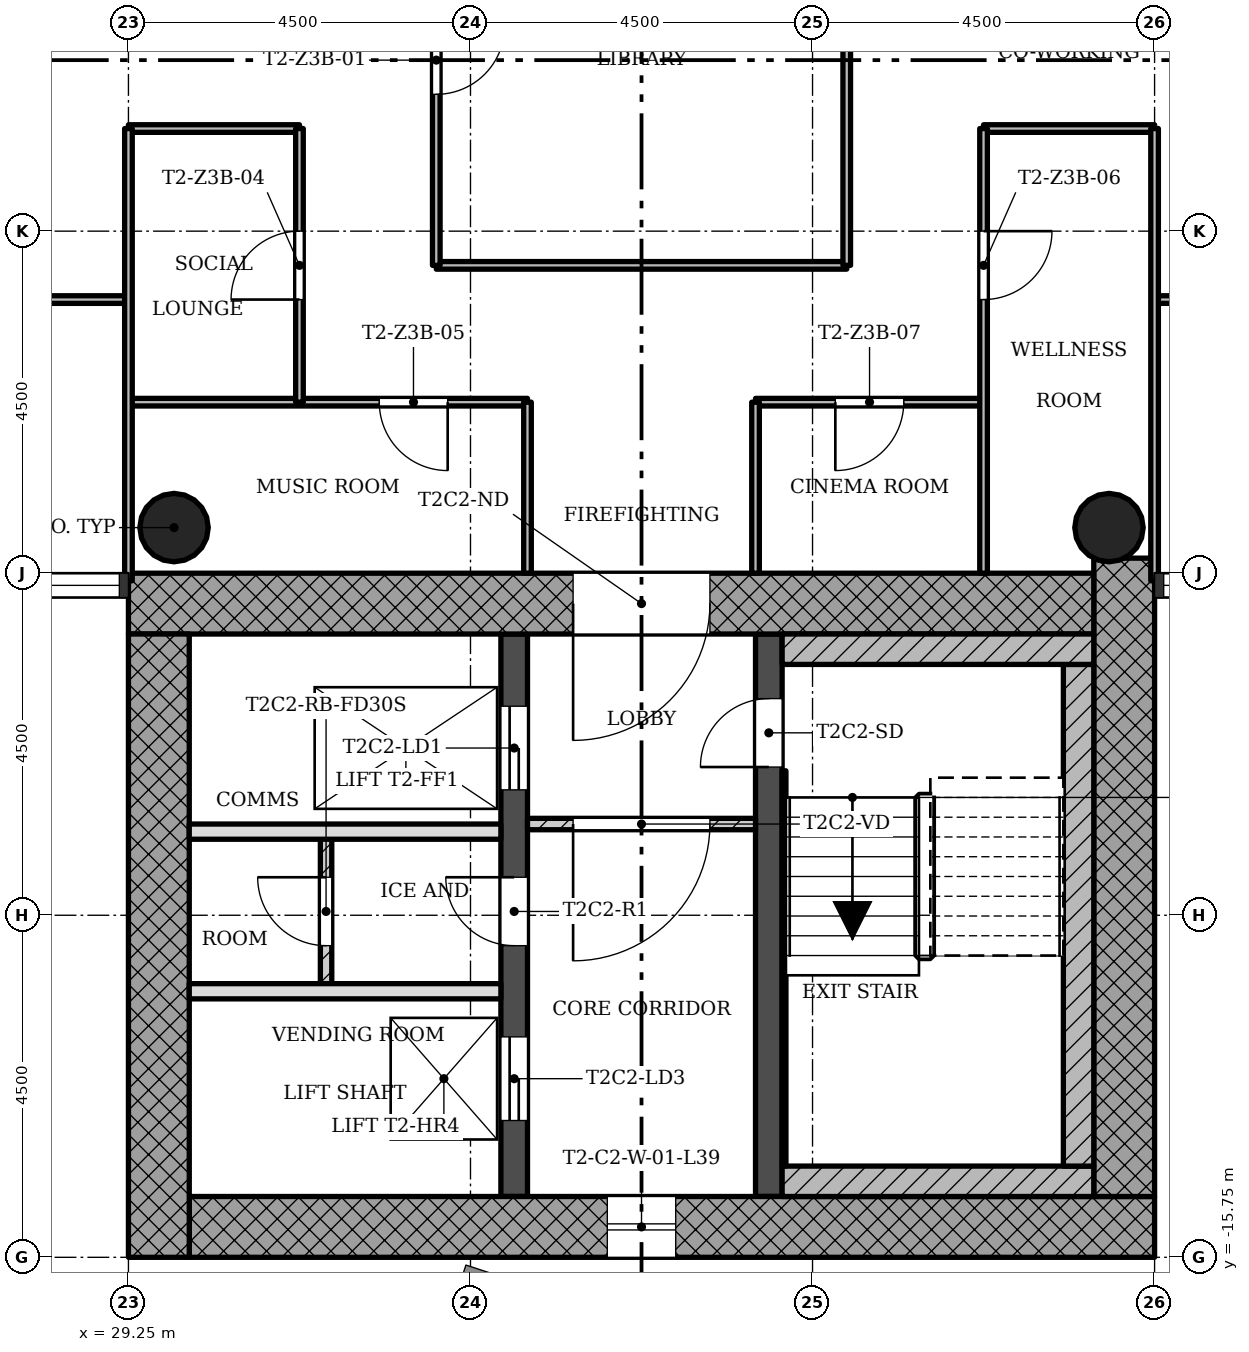
"""IFC4 building model, lengths in metres.
Left out: names, types, materials, properties, quantities, classifications, styles, units other than length and angle.
Written with IfcOpenShell. Run it as: python <this file> out.ifc"""

import sys

from ifc_helpers import new_model, si_unit, direction, frame, frame_2d, origin, origin_2d, place, context, subcontext, project, spatial, rectangle, hollow_circle, extrude, element, fill, save


model = new_model("IFC4")
c1 = context("Model", 3, precision=1e-05, world=origin(), true_north=direction((0.0, 1.0)))
c2 = subcontext(c1, "Body", "Model", "MODEL_VIEW")
j1 = project(units=[si_unit("LENGTHUNIT", "METRE"), si_unit("PLANEANGLEUNIT", "RADIAN")], contexts=[c1])
p1 = place(None, origin())
s1 = spatial("IfcSite", under=j1, at=p1, CompositionType="ELEMENT")
p2 = place(p1, origin())
s2 = spatial("IfcBuilding", under=s1, at=p2, CompositionType="ELEMENT")
p3 = place(p2, frame((0.0, 0.0, 143.9)))
s3 = spatial("IfcBuildingStorey", under=s2, at=p3, CompositionType="ELEMENT", Elevation=143.9)
p4 = place(p3, frame((30.05, -15.35, 0.0), z_axis=(0.0, 0.0, 1.0), x_axis=(1.0, 0.0, 0.0)))
e1 = element("IfcWall", 1, at=p4, inside=s3, PredefinedType="SHEAR", context=c2, shape_type="SweptSolid", body=[
    extrude(rectangle(XDim=12.7, YDim=0.8, at=frame_2d((6.35, 0.0))), origin(), (0.0, 0.0, 1.0), 3.4),
])
p5 = place(p4, frame((5.5, 0.0, 0.45)))
e2 = element("IfcOpeningElement", 2, at=p5, cuts=e1, PredefinedType="OPENING", context=c2, shape_type="SweptSolid", body=[
    extrude(rectangle(XDim=0.9, YDim=2.4, at=frame_2d((0.45, 1.2))), frame((0.0, 0.41, 0.0), z_axis=(0.0, -1.0, 0.0), x_axis=(1.0, 0.0, 0.0)), (0.0, 0.0, 1.0), 0.82),
])
p6 = place(p3, frame((42.35, -14.95, 0.0), z_axis=(0.0, 0.0, 1.0), x_axis=(0.0, 1.0, 0.0)))
e3 = element("IfcWall", 3, at=p6, inside=s3, PredefinedType="SHEAR", context=c2, shape_type="SweptSolid", body=[
    extrude(rectangle(XDim=8.398, YDim=0.8, at=frame_2d((4.199, 0.0))), origin(), (0.0, 0.0, 1.0), 3.4),
])
p7 = place(p3, frame((41.95, -7.15, 0.0), z_axis=(0.0, 0.0, 1.0), x_axis=(-1.0, 0.0, 0.0)))
e4 = element("IfcWall", 4, at=p7, inside=s3, PredefinedType="SHEAR", context=c2, shape_type="SweptSolid", body=[
    extrude(rectangle(XDim=12.7, YDim=0.8, at=frame_2d((6.35, 0.0))), origin(), (0.0, 0.0, 1.0), 3.4),
])
p8 = place(p7, frame((5.05, 0.0, 0.0)))
e5 = element("IfcOpeningElement", 5, at=p8, cuts=e4, PredefinedType="OPENING", context=c2, shape_type="SweptSolid", body=[
    extrude(rectangle(XDim=1.8, YDim=2.1, at=frame_2d((0.9, 1.05))), frame((0.0, 0.41, 0.0), z_axis=(0.0, -1.0, 0.0), x_axis=(1.0, 0.0, 0.0)), (0.0, 0.0, 1.0), 0.82),
])
p9 = place(p3, frame((29.65, -7.55, 0.0), z_axis=(0.0, 0.0, 1.0), x_axis=(0.0, -1.0, 0.0)))
e6 = element("IfcWall", 6, at=p9, inside=s3, PredefinedType="SHEAR", context=c2, shape_type="SweptSolid", body=[
    extrude(rectangle(XDim=8.2, YDim=0.8, at=frame_2d((4.1, 0.0))), origin(), (0.0, 0.0, 1.0), 3.4),
])
p10 = place(p3, frame((34.325, -14.95, 0.0), z_axis=(0.0, 0.0, 1.0), x_axis=(0.0, 1.0, 0.0)))
e7 = element("IfcWall", 7, at=p10, inside=s3, PredefinedType="SHEAR", context=c2, shape_type="SweptSolid", body=[
    extrude(rectangle(XDim=7.4, YDim=0.35, at=frame_2d((3.7, 0.0))), origin(), (0.0, 0.0, 1.0), 3.4),
])
p11 = place(p10, frame((5.35, 0.0, 0.0)))
e8 = element("IfcOpeningElement", 8, at=p11, cuts=e7, PredefinedType="OPENING", context=c2, shape_type="SweptSolid", body=[
    extrude(rectangle(XDim=1.1, YDim=2.1, at=frame_2d((0.55, 1.05))), frame((0.0, 0.185, 0.0), z_axis=(0.0, -1.0, 0.0), x_axis=(1.0, 0.0, 0.0)), (0.0, 0.0, 1.0), 0.37),
])
p12 = place(p10, frame((1.0, 0.0, 0.0)))
e9 = element("IfcOpeningElement", 9, at=p12, cuts=e7, PredefinedType="OPENING", context=c2, shape_type="SweptSolid", body=[
    extrude(rectangle(XDim=1.1, YDim=2.1, at=frame_2d((0.55, 1.05))), frame((0.0, 0.185, 0.0), z_axis=(0.0, -1.0, 0.0), x_axis=(1.0, 0.0, 0.0)), (0.0, 0.0, 1.0), 0.37),
])
p13 = place(p10, frame((3.3, 0.0, 0.0)))
e10 = element("IfcOpeningElement", 10, at=p13, cuts=e7, PredefinedType="OPENING", context=c2, shape_type="SweptSolid", body=[
    extrude(rectangle(XDim=0.9, YDim=2.1, at=frame_2d((0.45, 1.05))), frame((0.0, 0.185, 0.0), z_axis=(0.0, -1.0, 0.0), x_axis=(1.0, 0.0, 0.0)), (0.0, 0.0, 1.0), 0.37),
])
p14 = place(p3, frame((37.675, -14.95, 0.0), z_axis=(0.0, 0.0, 1.0), x_axis=(0.0, 1.0, 0.0)))
e11 = element("IfcWall", 11, at=p14, inside=s3, PredefinedType="SHEAR", context=c2, shape_type="SweptSolid", body=[
    extrude(rectangle(XDim=7.4, YDim=0.35, at=frame_2d((3.7, 0.0))), origin(), (0.0, 0.0, 1.0), 3.4),
])
p15 = place(p14, frame((5.65, 0.0, 0.0)))
e12 = element("IfcOpeningElement", 12, at=p15, cuts=e11, PredefinedType="OPENING", context=c2, shape_type="SweptSolid", body=[
    extrude(rectangle(XDim=0.9, YDim=2.1, at=frame_2d((0.45, 1.05))), frame((0.0, 0.185, 0.0), z_axis=(0.0, -1.0, 0.0), x_axis=(1.0, 0.0, 0.0)), (0.0, 0.0, 1.0), 0.37),
])
for number, where, z_axis, x_axis in (
    (13, (42.15, -6.15, 0.0), (0.0, 0.0, 1.0), (1.0, 0.0, 0.0)),
    (14, (29.85, -6.15, 0.0), (0.0, 0.0, 1.0), (1.0, 0.0, 0.0)),
):
    element("IfcColumn", number, at=place(p3, frame(where, z_axis=z_axis, x_axis=x_axis)), inside=s3, PredefinedType="COLUMN", context=c2, shape_type="SweptSolid", body=[
        extrude(hollow_circle(Radius=0.45, WallThickness=0.032, at=origin_2d()), origin(), (0.0, 0.0, 1.0), 3.4),
    ])
p16 = place(p3, frame((34.5, -10.05, 0.0), z_axis=(0.0, 0.0, 1.0), x_axis=(1.0, 0.0, 0.0)))
e15 = element("IfcWall", 15, at=p16, inside=s3, PredefinedType="PARTITIONING", context=c2, shape_type="SweptSolid", body=[
    extrude(rectangle(XDim=3.0, YDim=0.15, at=frame_2d((1.5, 0.0))), origin(), (0.0, 0.0, 1.0), 3.0),
])
p17 = place(p16, frame((0.6, 0.0, 0.0)))
e16 = element("IfcOpeningElement", 16, at=p17, cuts=e15, PredefinedType="OPENING", context=c2, shape_type="SweptSolid", body=[
    extrude(rectangle(XDim=1.8, YDim=2.1, at=frame_2d((0.9, 1.05))), frame((0.0, 0.085, 0.0), z_axis=(0.0, -1.0, 0.0), x_axis=(1.0, 0.0, 0.0)), (0.0, 0.0, 1.0), 0.17),
])
for number, where, z_axis, x_axis in (
    (17, (30.05, -12.25, 0.0), (0.0, 0.0, 1.0), (1.0, 0.0, 0.0)),
    (18, (30.05, -10.15, 0.0), (0.0, 0.0, 1.0), (1.0, 0.0, 0.0)),
):
    element("IfcWall", number, at=place(p3, frame(where, z_axis=z_axis, x_axis=x_axis)), inside=s3, PredefinedType="SOLIDWALL", context=c2, shape_type="SweptSolid", body=[
        extrude(rectangle(XDim=4.1, YDim=0.2, at=frame_2d((2.05, 0.0))), origin(), (0.0, 0.0, 1.0), 3.0),
    ])
p18 = place(p3, frame((31.85, -10.15, 0.0), z_axis=(0.0, 0.0, 1.0), x_axis=(0.0, -1.0, 0.0)))
e19 = element("IfcWall", 19, at=p18, inside=s3, PredefinedType="PARTITIONING", context=c2, shape_type="SweptSolid", body=[
    extrude(rectangle(XDim=2.1, YDim=0.15, at=frame_2d((1.05, 0.0))), origin(), (0.0, 0.0, 1.0), 3.0),
])
p19 = place(p18, frame((0.6, 0.0, 0.0)))
e20 = element("IfcOpeningElement", 20, at=p19, cuts=e19, PredefinedType="OPENING", context=c2, shape_type="SweptSolid", body=[
    extrude(rectangle(XDim=0.9, YDim=2.1, at=frame_2d((0.45, 1.05))), frame((0.0, 0.085, 0.0), z_axis=(0.0, -1.0, 0.0), x_axis=(1.0, 0.0, 0.0)), (0.0, 0.0, 1.0), 0.17),
])
p20 = place(p3, frame((40.5, -4.5, 0.0), z_axis=(0.0, 0.0, 1.0), x_axis=(-1.0, 0.0, 0.0)))
e21 = element("IfcWall", 21, at=p20, inside=s3, PredefinedType="PARTITIONING", context=c2, shape_type="SweptSolid", body=[
    extrude(rectangle(XDim=3.0, YDim=0.1, at=frame_2d((1.5, 0.0))), origin(), (0.0, 0.0, 1.0), 3.0),
])
p21 = place(p20, frame((1.05, 0.0, 0.0)))
e22 = element("IfcOpeningElement", 22, at=p21, cuts=e21, PredefinedType="OPENING", context=c2, shape_type="SweptSolid", body=[
    extrude(rectangle(XDim=0.9, YDim=2.1, at=frame_2d((0.45, 1.05))), frame((0.0, 0.06, 0.0), z_axis=(0.0, -1.0, 0.0), x_axis=(1.0, 0.0, 0.0)), (0.0, 0.0, 1.0), 0.12),
])
p22 = place(p3, frame((34.5, -4.5, 0.0), z_axis=(0.0, 0.0, 1.0), x_axis=(-1.0, 0.0, 0.0)))
e23 = element("IfcWall", 23, at=p22, inside=s3, PredefinedType="PARTITIONING", context=c2, shape_type="SweptSolid", body=[
    extrude(rectangle(XDim=5.25, YDim=0.1, at=frame_2d((2.625, 0.0))), origin(), (0.0, 0.0, 1.0), 3.0),
])
p23 = place(p22, frame((1.05, 0.0, 0.0)))
e24 = element("IfcOpeningElement", 24, at=p23, cuts=e23, PredefinedType="OPENING", context=c2, shape_type="SweptSolid", body=[
    extrude(rectangle(XDim=0.9, YDim=2.1, at=frame_2d((0.45, 1.05))), frame((0.0, 0.06, 0.0), z_axis=(0.0, -1.0, 0.0), x_axis=(1.0, 0.0, 0.0)), (0.0, 0.0, 1.0), 0.12),
])
p24 = place(p3, frame((47.25, -3.15, 0.0), z_axis=(0.0, 0.0, 1.0), x_axis=(-1.0, 0.0, 0.0)))
e25 = element("IfcWall", 25, at=p24, inside=s3, PredefinedType="PARTITIONING", context=c2, shape_type="SweptSolid", body=[
    extrude(rectangle(XDim=4.5, YDim=0.1, at=frame_2d((2.25, 0.0))), origin(), (0.0, 0.0, 1.0), 3.0),
])
p25 = place(p24, frame((1.8, 0.0, 0.0)))
e26 = element("IfcOpeningElement", 26, at=p25, cuts=e25, PredefinedType="OPENING", context=c2, shape_type="SweptSolid", body=[
    extrude(rectangle(XDim=0.9, YDim=2.1, at=frame_2d((0.45, 1.05))), frame((0.0, 0.06, 0.0), z_axis=(0.0, -1.0, 0.0), x_axis=(1.0, 0.0, 0.0)), (0.0, 0.0, 1.0), 0.12),
])
p26 = place(p3, frame((29.25, -3.15, 0.0), z_axis=(0.0, 0.0, 1.0), x_axis=(-1.0, 0.0, 0.0)))
e27 = element("IfcWall", 27, at=p26, inside=s3, PredefinedType="PARTITIONING", context=c2, shape_type="SweptSolid", body=[
    extrude(rectangle(XDim=9.0, YDim=0.1, at=frame_2d((4.5, 0.0))), origin(), (0.0, 0.0, 1.0), 3.0),
])
p27 = place(p26, frame((1.8, 0.0, 0.0)))
e28 = element("IfcOpeningElement", 28, at=p27, cuts=e27, PredefinedType="OPENING", context=c2, shape_type="SweptSolid", body=[
    extrude(rectangle(XDim=0.9, YDim=2.1, at=frame_2d((0.45, 1.05))), frame((0.0, 0.06, 0.0), z_axis=(0.0, -1.0, 0.0), x_axis=(1.0, 0.0, 0.0)), (0.0, 0.0, 1.0), 0.12),
])
p28 = place(p26, frame((6.3, 0.0, 0.0)))
e29 = element("IfcOpeningElement", 29, at=p28, cuts=e27, PredefinedType="OPENING", context=c2, shape_type="SweptSolid", body=[
    extrude(rectangle(XDim=0.9, YDim=2.1, at=frame_2d((0.45, 1.05))), frame((0.0, 0.06, 0.0), z_axis=(0.0, -1.0, 0.0), x_axis=(1.0, 0.0, 0.0)), (0.0, 0.0, 1.0), 0.12),
])
p29 = place(p3, frame((38.7, -2.7, 0.0), z_axis=(0.0, 0.0, 1.0), x_axis=(-1.0, 0.0, 0.0)))
e30 = element("IfcWall", 30, at=p29, inside=s3, PredefinedType="PARTITIONING", context=c2, shape_type="SweptSolid", body=[
    extrude(rectangle(XDim=5.4, YDim=0.1, at=frame_2d((2.7, 0.0))), origin(), (0.0, 0.0, 1.0), 3.0),
])
for number, where, z_axis, x_axis in (
    (31, (42.75, -0.9, 0.0), (0.0, 0.0, 1.0), (-1.0, 0.0, 0.0)),
    (32, (31.5, -0.9, 0.0), (0.0, 0.0, 1.0), (-1.0, 0.0, 0.0)),
):
    element("IfcWall", number, at=place(p3, frame(where, z_axis=z_axis, x_axis=x_axis)), inside=s3, PredefinedType="PARTITIONING", context=c2, shape_type="SweptSolid", body=[
        extrude(rectangle(XDim=2.25, YDim=0.1, at=frame_2d((1.125, 0.0))), origin(), (0.0, 0.0, 1.0), 3.0),
    ])
p30 = place(p3, frame((42.75, -6.85, 0.0), z_axis=(0.0, 0.0, 1.0), x_axis=(0.0, 1.0, 0.0)))
e33 = element("IfcWall", 33, at=p30, inside=s3, PredefinedType="PARTITIONING", context=c2, shape_type="SweptSolid", body=[
    extrude(rectangle(XDim=5.95, YDim=0.1, at=frame_2d((2.975, 0.0))), origin(), (0.0, 0.0, 1.0), 3.0),
])
p31 = place(p3, frame((40.5, -6.75, 0.0), z_axis=(0.0, 0.0, 1.0), x_axis=(0.0, 1.0, 0.0)))
e34 = element("IfcWall", 34, at=p31, inside=s3, PredefinedType="PARTITIONING", context=c2, shape_type="SweptSolid", body=[
    extrude(rectangle(XDim=5.85, YDim=0.1, at=frame_2d((2.925, 0.0))), origin(), (0.0, 0.0, 1.0), 3.0),
])
p32 = place(p31, frame((3.6, 0.0, 0.0)))
e35 = element("IfcOpeningElement", 35, at=p32, cuts=e34, PredefinedType="OPENING", context=c2, shape_type="SweptSolid", body=[
    extrude(rectangle(XDim=0.9, YDim=2.1, at=frame_2d((0.45, 1.05))), frame((0.0, 0.06, 0.0), z_axis=(0.0, -1.0, 0.0), x_axis=(1.0, 0.0, 0.0)), (0.0, 0.0, 1.0), 0.12),
])
p33 = place(p3, frame((38.7, -2.7, 0.0), z_axis=(0.0, 0.0, 1.0), x_axis=(0.0, 1.0, 0.0)))
e36 = element("IfcWall", 36, at=p33, inside=s3, PredefinedType="PARTITIONING", context=c2, shape_type="SweptSolid", body=[
    extrude(rectangle(XDim=5.4, YDim=0.1, at=frame_2d((2.7, 0.0))), origin(), (0.0, 0.0, 1.0), 3.0),
])
for number, where, z_axis, x_axis in (
    (37, (37.5, -6.75, 0.0), (0.0, 0.0, 1.0), (0.0, 1.0, 0.0)),
    (38, (34.5, -6.75, 0.0), (0.0, 0.0, 1.0), (0.0, 1.0, 0.0)),
):
    element("IfcWall", number, at=place(p3, frame(where, z_axis=z_axis, x_axis=x_axis)), inside=s3, PredefinedType="PARTITIONING", context=c2, shape_type="SweptSolid", body=[
        extrude(rectangle(XDim=2.25, YDim=0.1, at=frame_2d((1.125, 0.0))), origin(), (0.0, 0.0, 1.0), 3.0),
    ])
p34 = place(p3, frame((33.3, -2.7, 0.0), z_axis=(0.0, 0.0, 1.0), x_axis=(0.0, 1.0, 0.0)))
e39 = element("IfcWall", 39, at=p34, inside=s3, PredefinedType="PARTITIONING", context=c2, shape_type="SweptSolid", body=[
    extrude(rectangle(XDim=5.4, YDim=0.1, at=frame_2d((2.7, 0.0))), origin(), (0.0, 0.0, 1.0), 3.0),
])
p35 = place(p34, frame((2.25, 0.0, 0.0)))
e40 = element("IfcOpeningElement", 40, at=p35, cuts=e39, PredefinedType="OPENING", context=c2, shape_type="SweptSolid", body=[
    extrude(rectangle(XDim=0.9, YDim=2.1, at=frame_2d((0.45, 1.05))), frame((0.0, 0.06, 0.0), z_axis=(0.0, -1.0, 0.0), x_axis=(1.0, 0.0, 0.0)), (0.0, 0.0, 1.0), 0.12),
])
p36 = place(p3, frame((31.5, -4.5, 0.0), z_axis=(0.0, 0.0, 1.0), x_axis=(0.0, 1.0, 0.0)))
e41 = element("IfcWall", 41, at=p36, inside=s3, PredefinedType="PARTITIONING", context=c2, shape_type="SweptSolid", body=[
    extrude(rectangle(XDim=3.6, YDim=0.1, at=frame_2d((1.8, 0.0))), origin(), (0.0, 0.0, 1.0), 3.0),
])
p37 = place(p36, frame((1.35, 0.0, 0.0)))
e42 = element("IfcOpeningElement", 42, at=p37, cuts=e41, PredefinedType="OPENING", context=c2, shape_type="SweptSolid", body=[
    extrude(rectangle(XDim=0.9, YDim=2.1, at=frame_2d((0.45, 1.05))), frame((0.0, 0.06, 0.0), z_axis=(0.0, -1.0, 0.0), x_axis=(1.0, 0.0, 0.0)), (0.0, 0.0, 1.0), 0.12),
])
p38 = place(p3, frame((29.25, -6.85, 0.0), z_axis=(0.0, 0.0, 1.0), x_axis=(0.0, 1.0, 0.0)))
e43 = element("IfcWall", 43, at=p38, inside=s3, PredefinedType="PARTITIONING", context=c2, shape_type="SweptSolid", body=[
    extrude(rectangle(XDim=5.95, YDim=0.1, at=frame_2d((2.975, 0.0))), origin(), (0.0, 0.0, 1.0), 3.0),
])
p39 = place(p3, frame((37.85, -14.75, 0.0), z_axis=(0.0, 0.0, 1.0), x_axis=(1.0, 0.0, 0.0)))
e44 = element("IfcWall", 44, at=p39, inside=s3, PredefinedType="SHEAR", context=c2, shape_type="SweptSolid", body=[
    extrude(rectangle(XDim=4.1, YDim=0.4, at=frame_2d((2.05, 0.0))), origin(), (0.0, 0.0, 1.0), 3.4),
])
p40 = place(p3, frame((41.75, -7.95, 0.0), z_axis=(0.0, 0.0, 1.0), x_axis=(0.0, -1.0, 0.0)))
e45 = element("IfcWall", 45, at=p40, inside=s3, PredefinedType="SHEAR", context=c2, shape_type="SweptSolid", body=[
    extrude(rectangle(XDim=6.6, YDim=0.4, at=frame_2d((3.3, 0.0))), origin(), (0.0, 0.0, 1.0), 3.4),
])
p41 = place(p3, frame((37.85, -7.75, 0.0), z_axis=(0.0, 0.0, 1.0), x_axis=(1.0, 0.0, 0.0)))
e46 = element("IfcWall", 46, at=p41, inside=s3, PredefinedType="SHEAR", context=c2, shape_type="SweptSolid", body=[
    extrude(rectangle(XDim=4.1, YDim=0.4, at=frame_2d((2.05, 0.0))), origin(), (0.0, 0.0, 1.0), 3.4),
])
p42 = place(p3, frame((37.875, -9.35, 0.0), z_axis=(0.0, 0.0, 1.0), x_axis=(0.0, -1.0, 0.0)))
e47 = element("IfcWall", 47, at=p42, inside=s3, PredefinedType="SHEAR", context=c2, shape_type="SweptSolid", body=[
    extrude(rectangle(XDim=5.2, YDim=0.05, at=frame_2d((2.6, 0.0))), origin(), (0.0, 0.0, 1.0), 3.4),
])
p43 = place(p5, origin())
e48 = element("IfcWindow", 48, at=p43, inside=s3, PartitioningType="SINGLE_PANEL", PredefinedType="WINDOW", context=c2, shape_type="SweptSolid", body=[
    extrude(rectangle(XDim=0.9, YDim=2.4, at=frame_2d((0.45, 1.2))), frame((0.0, 0.03, 0.0), z_axis=(0.0, -1.0, 0.0), x_axis=(1.0, 0.0, 0.0)), (0.0, 0.0, 1.0), 0.06),
])
fill(e2, e48)
p44 = place(p17, origin())
e49 = element("IfcDoor", 49, at=p44, inside=s3, OperationType="SINGLE_SWING_LEFT", PredefinedType="DOOR", context=c2, shape_type="SweptSolid", body=[
    extrude(rectangle(XDim=1.8, YDim=2.1, at=frame_2d((0.9, 1.05))), frame((0.0, 0.025, 0.0), z_axis=(0.0, -1.0, 0.0), x_axis=(1.0, 0.0, 0.0)), (0.0, 0.0, 1.0), 0.05),
])
fill(e16, e49)
p45 = place(p19, origin())
e50 = element("IfcDoor", 50, at=p45, inside=s3, OperationType="SINGLE_SWING_LEFT", PredefinedType="DOOR", context=c2, shape_type="SweptSolid", body=[
    extrude(rectangle(XDim=0.9, YDim=2.1, at=frame_2d((0.45, 1.05))), frame((0.0, 0.025, 0.0), z_axis=(0.0, -1.0, 0.0), x_axis=(1.0, 0.0, 0.0)), (0.0, 0.0, 1.0), 0.05),
])
fill(e20, e50)
p46 = place(p35, origin())
e51 = element("IfcDoor", 51, at=p46, inside=s3, OperationType="SINGLE_SWING_RIGHT", PredefinedType="DOOR", context=c2, shape_type="SweptSolid", body=[
    extrude(rectangle(XDim=0.9, YDim=2.1, at=frame_2d((0.45, 1.05))), frame((0.0, 0.025, 0.0), z_axis=(0.0, -1.0, 0.0), x_axis=(1.0, 0.0, 0.0)), (0.0, 0.0, 1.0), 0.05),
])
fill(e40, e51)
p47 = place(p37, origin())
e52 = element("IfcDoor", 52, at=p47, inside=s3, OperationType="SINGLE_SWING_RIGHT", PredefinedType="DOOR", context=c2, shape_type="SweptSolid", body=[
    extrude(rectangle(XDim=0.9, YDim=2.1, at=frame_2d((0.45, 1.05))), frame((0.0, 0.025, 0.0), z_axis=(0.0, -1.0, 0.0), x_axis=(1.0, 0.0, 0.0)), (0.0, 0.0, 1.0), 0.05),
])
fill(e42, e52)
p48 = place(p23, origin())
e53 = element("IfcDoor", 53, at=p48, inside=s3, OperationType="SINGLE_SWING_RIGHT", PredefinedType="DOOR", context=c2, shape_type="SweptSolid", body=[
    extrude(rectangle(XDim=0.9, YDim=2.1, at=frame_2d((0.45, 1.05))), frame((0.0, 0.025, 0.0), z_axis=(0.0, -1.0, 0.0), x_axis=(1.0, 0.0, 0.0)), (0.0, 0.0, 1.0), 0.05),
])
fill(e24, e53)
p49 = place(p32, origin())
e54 = element("IfcDoor", 54, at=p49, inside=s3, OperationType="SINGLE_SWING_RIGHT", PredefinedType="DOOR", context=c2, shape_type="SweptSolid", body=[
    extrude(rectangle(XDim=0.9, YDim=2.1, at=frame_2d((0.45, 1.05))), frame((0.0, 0.025, 0.0), z_axis=(0.0, -1.0, 0.0), x_axis=(1.0, 0.0, 0.0)), (0.0, 0.0, 1.0), 0.05),
])
fill(e35, e54)
p50 = place(p21, origin())
e55 = element("IfcDoor", 55, at=p50, inside=s3, OperationType="SINGLE_SWING_LEFT", PredefinedType="DOOR", context=c2, shape_type="SweptSolid", body=[
    extrude(rectangle(XDim=0.9, YDim=2.1, at=frame_2d((0.45, 1.05))), frame((0.0, 0.025, 0.0), z_axis=(0.0, -1.0, 0.0), x_axis=(1.0, 0.0, 0.0)), (0.0, 0.0, 1.0), 0.05),
])
fill(e22, e55)
p51 = place(p15, origin())
e56 = element("IfcDoor", 56, at=p51, inside=s3, OperationType="SINGLE_SWING_RIGHT", PredefinedType="DOOR", context=c2, shape_type="SweptSolid", body=[
    extrude(rectangle(XDim=0.9, YDim=2.1, at=frame_2d((0.45, 1.05))), frame((0.0, 0.025, 0.0), z_axis=(0.0, -1.0, 0.0), x_axis=(1.0, 0.0, 0.0)), (0.0, 0.0, 1.0), 0.05),
])
fill(e12, e56)
p52 = place(p11, origin())
e57 = element("IfcDoor", 57, at=p52, inside=s3, OperationType="SLIDING_TO_LEFT", PredefinedType="DOOR", context=c2, shape_type="SweptSolid", body=[
    extrude(rectangle(XDim=1.1, YDim=2.1, at=frame_2d((0.55, 1.05))), frame((0.0, 0.025, 0.0), z_axis=(0.0, -1.0, 0.0), x_axis=(1.0, 0.0, 0.0)), (0.0, 0.0, 1.0), 0.05),
])
fill(e8, e57)
p53 = place(p12, origin())
e58 = element("IfcDoor", 58, at=p53, inside=s3, OperationType="SLIDING_TO_LEFT", PredefinedType="DOOR", context=c2, shape_type="SweptSolid", body=[
    extrude(rectangle(XDim=1.1, YDim=2.1, at=frame_2d((0.55, 1.05))), frame((0.0, 0.025, 0.0), z_axis=(0.0, -1.0, 0.0), x_axis=(1.0, 0.0, 0.0)), (0.0, 0.0, 1.0), 0.05),
])
fill(e9, e58)
p54 = place(p13, origin())
e59 = element("IfcDoor", 59, at=p54, inside=s3, OperationType="SINGLE_SWING_LEFT", PredefinedType="DOOR", context=c2, shape_type="SweptSolid", body=[
    extrude(rectangle(XDim=0.9, YDim=2.1, at=frame_2d((0.45, 1.05))), frame((0.0, 0.025, 0.0), z_axis=(0.0, -1.0, 0.0), x_axis=(1.0, 0.0, 0.0)), (0.0, 0.0, 1.0), 0.05),
])
fill(e10, e59)
p55 = place(p8, origin())
e60 = element("IfcDoor", 60, at=p55, inside=s3, OperationType="SINGLE_SWING_LEFT", PredefinedType="DOOR", context=c2, shape_type="SweptSolid", body=[
    extrude(rectangle(XDim=1.8, YDim=2.1, at=frame_2d((0.9, 1.05))), frame((0.0, 0.025, 0.0), z_axis=(0.0, -1.0, 0.0), x_axis=(1.0, 0.0, 0.0)), (0.0, 0.0, 1.0), 0.05),
])
fill(e5, e60)
save(model, sys.argv[1])
